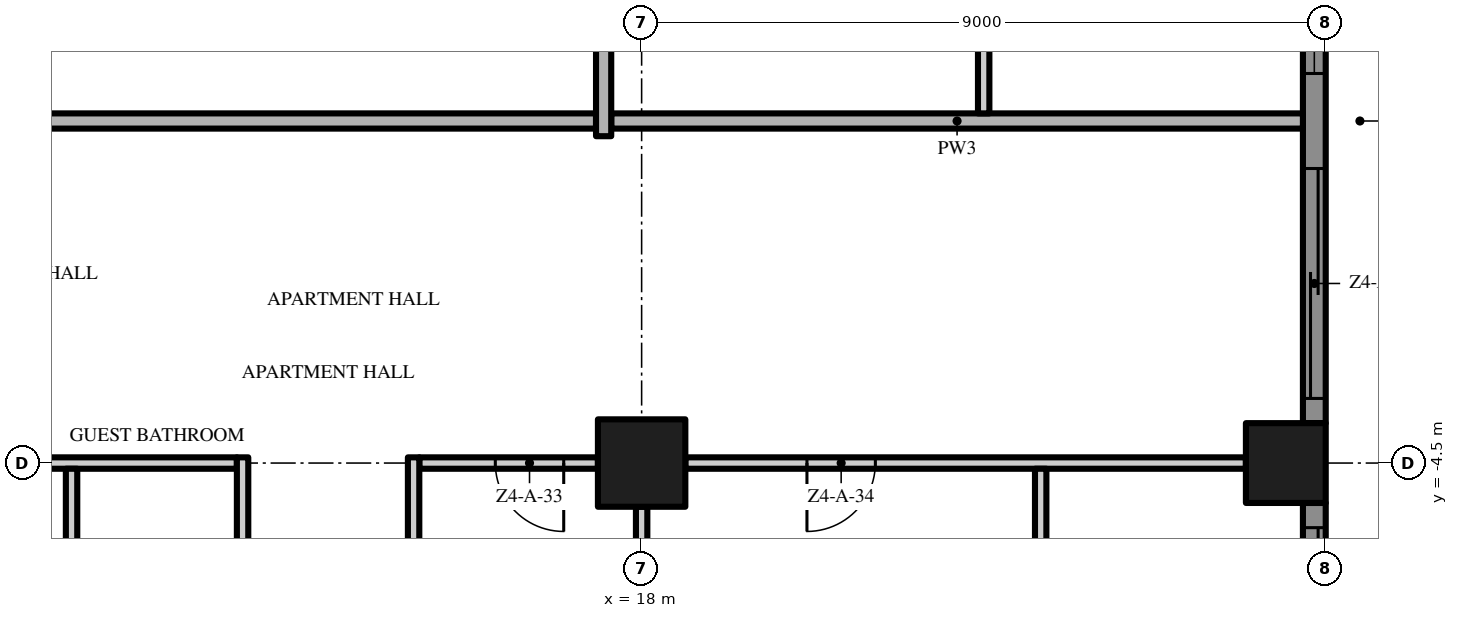
"""IFC4 building model, lengths in metres.
Left out: names, types, materials, properties, quantities, classifications, styles, units other than length and angle.
Written with IfcOpenShell. Run it as: python <this file> out.ifc"""

import sys

from ifc_helpers import new_model, si_unit, direction, frame, frame_2d, origin, origin_2d, place, context, subcontext, project, spatial, polyline, rectangle, outline, extrude, element, fill, save


model = new_model("IFC4")
c1 = context("Model", 3, precision=1e-05, world=origin(), true_north=direction((0.0, 1.0)))
c2 = subcontext(c1, "Body", "Model", "MODEL_VIEW")
j1 = project(units=[si_unit("LENGTHUNIT", "METRE"), si_unit("PLANEANGLEUNIT", "RADIAN")], contexts=[c1])
p1 = place(None, origin())
s1 = spatial("IfcSite", under=j1, at=p1, CompositionType="ELEMENT")
p2 = place(p1, origin())
s2 = spatial("IfcBuilding", under=s1, at=p2, CompositionType="ELEMENT")
p3 = place(p2, frame((0.0, 0.0, 192.0)))
s3 = spatial("IfcBuildingStorey", under=s2, at=p3, CompositionType="ELEMENT", Elevation=192.0)
p4 = place(p3, frame((18.0, -4.5, 0.0), z_axis=(0.0, 0.0, 1.0), x_axis=(1.0, 0.0, 0.0)))
e1 = element("IfcColumn", 1, at=p4, inside=s3, PredefinedType="COLUMN", context=c2, shape_type="SweptSolid", body=[
    extrude(rectangle(XDim=1.15, YDim=1.15, at=origin_2d()), origin(), (0.0, 0.0, 1.0), 3.5),
])
p5 = place(p3, frame((26.475, -4.5, 0.0), z_axis=(0.0, 0.0, 1.0), x_axis=(1.0, 0.0, 0.0)))
e2 = element("IfcColumn", 2, at=p5, inside=s3, PredefinedType="COLUMN", context=c2, shape_type="SweptSolid", body=[
    extrude(rectangle(XDim=1.05, YDim=1.05, at=origin_2d()), origin(), (0.0, 0.0, 1.0), 3.5),
])
p6 = place(p3, frame((26.85, -5.025, 0.0), z_axis=(0.0, 0.0, 1.0), x_axis=(0.0, -1.0, 0.0)))
e3 = element("IfcWall", 3, at=p6, inside=s3, PredefinedType="SOLIDWALL", context=c2, shape_type="SweptSolid", body=[
    extrude(rectangle(XDim=7.95, YDim=0.3, at=frame_2d((3.975, 0.0))), origin(), (0.0, 0.0, 1.0), 3.5),
])
p7 = place(p6, frame((4.6, 0.0, 0.45)))
e4 = element("IfcOpeningElement", 4, at=p7, cuts=e3, PredefinedType="OPENING", context=c2, shape_type="SweptSolid", body=[
    extrude(rectangle(XDim=3.025, YDim=2.65, at=frame_2d((1.512, 1.325))), frame((0.0, 0.16, 0.0), z_axis=(0.0, -1.0, 0.0), x_axis=(1.0, 0.0, 0.0)), (0.0, 0.0, 1.0), 0.32),
])
p8 = place(p6, frame((0.325, 0.0, 0.0)))
e5 = element("IfcOpeningElement", 5, at=p8, cuts=e3, PredefinedType="OPENING", context=c2, shape_type="SweptSolid", body=[
    extrude(rectangle(XDim=3.025, YDim=2.4, at=frame_2d((1.512, 1.2))), frame((0.0, 0.16, 0.0), z_axis=(0.0, -1.0, 0.0), x_axis=(1.0, 0.0, 0.0)), (0.0, 0.0, 1.0), 0.32),
])
p9 = place(p3, frame((26.85, 3.975, 0.0), z_axis=(0.0, 0.0, 1.0), x_axis=(0.0, -1.0, 0.0)))
e6 = element("IfcWall", 6, at=p9, inside=s3, PredefinedType="SOLIDWALL", context=c2, shape_type="SweptSolid", body=[
    extrude(rectangle(XDim=7.95, YDim=0.3, at=frame_2d((3.975, 0.0))), origin(), (0.0, 0.0, 1.0), 3.5),
])
p10 = place(p9, frame((4.6, 0.0, 0.0)))
e7 = element("IfcOpeningElement", 7, at=p10, cuts=e6, PredefinedType="OPENING", context=c2, shape_type="SweptSolid", body=[
    extrude(rectangle(XDim=3.025, YDim=2.4, at=frame_2d((1.512, 1.2))), frame((0.0, 0.16, 0.0), z_axis=(0.0, -1.0, 0.0), x_axis=(1.0, 0.0, 0.0)), (0.0, 0.0, 1.0), 0.32),
])
p11 = place(p9, frame((0.325, 0.0, 0.45)))
e8 = element("IfcOpeningElement", 8, at=p11, cuts=e6, PredefinedType="OPENING", context=c2, shape_type="SweptSolid", body=[
    extrude(rectangle(XDim=3.025, YDim=2.65, at=frame_2d((1.512, 1.325))), frame((0.0, 0.16, 0.0), z_axis=(0.0, -1.0, 0.0), x_axis=(1.0, 0.0, 0.0)), (0.0, 0.0, 1.0), 0.32),
])
p12 = place(p3, origin())
e9 = element("IfcWall", 9, at=p12, inside=s3, PredefinedType="USERDEFINED", context=c2, shape_type="SweptSolid", body=[
    extrude(outline(polyline([(29.649, -18.0), (28.988, -16.5), (28.255, -15.0), (27.731, -13.5), (27.6, -12.375), (27.615, -12.0), (27.951, -10.5), (28.612, -9.0), (29.345, -7.5), (29.869, -6.0), (30.0, -4.875), (29.985, -4.5), (29.649, -3.0), (28.988, -1.5), (28.255, 0.0), (27.731, 1.5), (27.6, 2.625), (27.615, 3.0), (27.951, 4.5), (28.612, 6.0), (29.345, 7.5), (29.869, 9.0), (30.0, 10.125), (29.985, 10.5), (29.649, 12.0), (28.988, 13.5), (28.255, 15.0), (27.731, 16.5), (27.6, 17.625), (27.615, 18.0), (27.365, 18.01), (27.349, 17.615), (27.486, 16.444), (28.024, 14.904), (28.761, 13.395), (29.41, 11.921), (29.736, 10.467), (29.749, 10.135), (29.624, 9.056), (29.114, 7.596), (28.385, 6.105), (27.713, 4.579), (27.366, 3.033), (27.349, 2.615), (27.486, 1.444), (28.024, -0.096), (28.761, -1.605), (29.41, -3.079), (29.736, -4.533), (29.749, -4.865), (29.624, -5.944), (29.114, -7.404), (28.385, -8.895), (27.713, -10.421), (27.366, -11.967), (27.349, -12.385), (27.486, -13.556), (28.024, -15.096), (28.761, -16.605), (29.42, -18.101), (29.649, -18.0)])), origin(), (0.0, 0.0, 1.0), 0.9),
])
p13 = place(p3, frame((9.575, -4.5, 0.0), z_axis=(0.0, 0.0, 1.0), x_axis=(1.0, 0.0, 0.0)))
e10 = element("IfcWall", 10, at=p13, inside=s3, PredefinedType="PARTITIONING", context=c2, shape_type="SweptSolid", body=[
    extrude(rectangle(XDim=3.1, YDim=0.15, at=frame_2d((1.55, 0.0))), origin(), (0.0, 0.0, 1.0), 3.5),
])
p14 = place(p3, frame((17.425, -4.5, 0.0), z_axis=(0.0, 0.0, 1.0), x_axis=(-1.0, 0.0, 0.0)))
e11 = element("IfcWall", 11, at=p14, inside=s3, PredefinedType="PARTITIONING", context=c2, shape_type="SweptSolid", body=[
    extrude(rectangle(XDim=2.35, YDim=0.15, at=frame_2d((1.175, 0.0))), origin(), (0.0, 0.0, 1.0), 3.5),
])
p15 = place(p14, frame((0.45, 0.0, 0.0)))
e12 = element("IfcOpeningElement", 12, at=p15, cuts=e11, PredefinedType="OPENING", context=c2, shape_type="SweptSolid", body=[
    extrude(rectangle(XDim=0.9, YDim=2.1, at=frame_2d((0.45, 1.05))), frame((0.0, 0.085, 0.0), z_axis=(0.0, -1.0, 0.0), x_axis=(1.0, 0.0, 0.0)), (0.0, 0.0, 1.0), 0.17),
])
p16 = place(p3, frame((25.95, -4.5, 0.0), z_axis=(0.0, 0.0, 1.0), x_axis=(-1.0, 0.0, 0.0)))
e13 = element("IfcWall", 13, at=p16, inside=s3, PredefinedType="PARTITIONING", context=c2, shape_type="SweptSolid", body=[
    extrude(rectangle(XDim=7.375, YDim=0.15, at=frame_2d((3.688, 0.0))), origin(), (0.0, 0.0, 1.0), 3.5),
])
p17 = place(p16, frame((4.875, 0.0, 0.0)))
e14 = element("IfcOpeningElement", 14, at=p17, cuts=e13, PredefinedType="OPENING", context=c2, shape_type="SweptSolid", body=[
    extrude(rectangle(XDim=0.9, YDim=2.1, at=frame_2d((0.45, 1.05))), frame((0.0, 0.085, 0.0), z_axis=(0.0, -1.0, 0.0), x_axis=(1.0, 0.0, 0.0)), (0.0, 0.0, 1.0), 0.17),
])
p18 = place(p3, frame((17.4, 0.0, 0.0), z_axis=(0.0, 0.0, 1.0), x_axis=(-1.0, 0.0, 0.0)))
e15 = element("IfcWall", 15, at=p18, inside=s3, PredefinedType="PARTITIONING", context=c2, shape_type="SweptSolid", body=[
    extrude(rectangle(XDim=17.3, YDim=0.2, at=frame_2d((8.65, 0.0))), origin(), (0.0, 0.0, 1.0), 3.5),
])
p19 = place(p18, frame((7.65, 0.0, 0.0)))
e16 = element("IfcOpeningElement", 16, at=p19, cuts=e15, PredefinedType="OPENING", context=c2, shape_type="SweptSolid", body=[
    extrude(rectangle(XDim=1.5, YDim=2.4, at=frame_2d((0.75, 1.2))), frame((0.0, 0.11, 0.0), z_axis=(0.0, -1.0, 0.0), x_axis=(1.0, 0.0, 0.0)), (0.0, 0.0, 1.0), 0.22),
])
p20 = place(p3, frame((17.6, 0.0, 0.0), z_axis=(0.0, 0.0, 1.0), x_axis=(1.0, 0.0, 0.0)))
e17 = element("IfcWall", 17, at=p20, inside=s3, PredefinedType="PARTITIONING", context=c2, shape_type="SweptSolid", body=[
    extrude(rectangle(XDim=9.1, YDim=0.2, at=frame_2d((4.55, 0.0))), origin(), (0.0, 0.0, 1.0), 3.5),
])
p21 = place(p3, frame((10.5, -8.925, 0.0), z_axis=(0.0, 0.0, 1.0), x_axis=(0.0, 1.0, 0.0)))
e18 = element("IfcWall", 18, at=p21, inside=s3, PredefinedType="PARTITIONING", context=c2, shape_type="SweptSolid", body=[
    extrude(rectangle(XDim=4.35, YDim=0.15, at=frame_2d((2.175, 0.0))), origin(), (0.0, 0.0, 1.0), 3.5),
])
p22 = place(p3, frame((12.75, -8.925, 0.0), z_axis=(0.0, 0.0, 1.0), x_axis=(0.0, 1.0, 0.0)))
e19 = element("IfcWall", 19, at=p22, inside=s3, PredefinedType="PARTITIONING", context=c2, shape_type="SweptSolid", body=[
    extrude(rectangle(XDim=4.5, YDim=0.15, at=frame_2d((2.25, 0.0))), origin(), (0.0, 0.0, 1.0), 3.5),
])
p23 = place(p22, frame((1.75, 0.0, 0.0)))
e20 = element("IfcOpeningElement", 20, at=p23, cuts=e19, PredefinedType="OPENING", context=c2, shape_type="SweptSolid", body=[
    extrude(rectangle(XDim=0.9, YDim=2.1, at=frame_2d((0.45, 1.05))), frame((0.0, 0.085, 0.0), z_axis=(0.0, -1.0, 0.0), x_axis=(1.0, 0.0, 0.0)), (0.0, 0.0, 1.0), 0.17),
])
p24 = place(p3, frame((15.0, -9.075, 0.0), z_axis=(0.0, 0.0, 1.0), x_axis=(0.0, 1.0, 0.0)))
e21 = element("IfcWall", 21, at=p24, inside=s3, PredefinedType="PARTITIONING", context=c2, shape_type="SweptSolid", body=[
    extrude(rectangle(XDim=4.65, YDim=0.15, at=frame_2d((2.325, 0.0))), origin(), (0.0, 0.0, 1.0), 3.5),
])
p25 = place(p3, frame((17.5, -0.2, 0.0), z_axis=(0.0, 0.0, 1.0), x_axis=(0.0, 1.0, 0.0)))
e22 = element("IfcWall", 22, at=p25, inside=s3, PredefinedType="PARTITIONING", context=c2, shape_type="SweptSolid", body=[
    extrude(rectangle(XDim=4.125, YDim=0.2, at=frame_2d((2.062, 0.0))), origin(), (0.0, 0.0, 1.0), 3.5),
])
p26 = place(p3, frame((18.0, -8.925, 0.0), z_axis=(0.0, 0.0, 1.0), x_axis=(0.0, 1.0, 0.0)))
e23 = element("IfcWall", 23, at=p26, inside=s3, PredefinedType="PARTITIONING", context=c2, shape_type="SweptSolid", body=[
    extrude(rectangle(XDim=3.85, YDim=0.15, at=frame_2d((1.925, 0.0))), origin(), (0.0, 0.0, 1.0), 3.5),
])
p27 = place(p3, frame((22.5, 17.475, 0.0), z_axis=(0.0, 0.0, 1.0), x_axis=(0.0, -1.0, 0.0)))
e24 = element("IfcWall", 24, at=p27, inside=s3, PredefinedType="PARTITIONING", context=c2, shape_type="SweptSolid", body=[
    extrude(rectangle(XDim=17.375, YDim=0.15, at=frame_2d((8.688, 0.0))), origin(), (0.0, 0.0, 1.0), 3.5),
])
p28 = place(p27, frame((14.725, 0.0, 0.0)))
e25 = element("IfcOpeningElement", 25, at=p28, cuts=e24, PredefinedType="OPENING", context=c2, shape_type="SweptSolid", body=[
    extrude(rectangle(XDim=1.0, YDim=2.4, at=frame_2d((0.5, 1.2))), frame((0.0, 0.085, 0.0), z_axis=(0.0, -1.0, 0.0), x_axis=(1.0, 0.0, 0.0)), (0.0, 0.0, 1.0), 0.17),
])
p29 = place(p27, frame((9.125, 0.0, 0.0)))
e26 = element("IfcOpeningElement", 26, at=p29, cuts=e24, PredefinedType="OPENING", context=c2, shape_type="SweptSolid", body=[
    extrude(rectangle(XDim=1.0, YDim=2.4, at=frame_2d((0.5, 1.2))), frame((0.0, 0.085, 0.0), z_axis=(0.0, -1.0, 0.0), x_axis=(1.0, 0.0, 0.0)), (0.0, 0.0, 1.0), 0.17),
])
p30 = place(p27, frame((2.325, 0.0, 0.0)))
e27 = element("IfcOpeningElement", 27, at=p30, cuts=e24, PredefinedType="OPENING", context=c2, shape_type="SweptSolid", body=[
    extrude(rectangle(XDim=1.8, YDim=2.4, at=frame_2d((0.9, 1.2))), frame((0.0, 0.085, 0.0), z_axis=(0.0, -1.0, 0.0), x_axis=(1.0, 0.0, 0.0)), (0.0, 0.0, 1.0), 0.17),
])
p31 = place(p3, frame((23.25, -4.575, 0.0), z_axis=(0.0, 0.0, 1.0), x_axis=(0.0, -1.0, 0.0)))
e28 = element("IfcWall", 28, at=p31, inside=s3, PredefinedType="PARTITIONING", context=c2, shape_type="SweptSolid", body=[
    extrude(rectangle(XDim=4.35, YDim=0.15, at=frame_2d((2.175, 0.0))), origin(), (0.0, 0.0, 1.0), 3.5),
])
p32 = place(p31, frame((1.7, 0.0, 0.0)))
e29 = element("IfcOpeningElement", 29, at=p32, cuts=e28, PredefinedType="OPENING", context=c2, shape_type="SweptSolid", body=[
    extrude(rectangle(XDim=0.9, YDim=2.1, at=frame_2d((0.45, 1.05))), frame((0.0, 0.085, 0.0), z_axis=(0.0, -1.0, 0.0), x_axis=(1.0, 0.0, 0.0)), (0.0, 0.0, 1.0), 0.17),
])
p33 = place(p8, origin())
e30 = element("IfcDoor", 30, at=p33, inside=s3, OperationType="SINGLE_SWING_LEFT", PredefinedType="DOOR", context=c2, shape_type="SweptSolid", body=[
    extrude(rectangle(XDim=3.025, YDim=2.4, at=frame_2d((1.512, 1.2))), frame((0.0, 0.025, 0.0), z_axis=(0.0, -1.0, 0.0), x_axis=(1.0, 0.0, 0.0)), (0.0, 0.0, 1.0), 0.05),
])
fill(e5, e30)
p34 = place(p10, origin())
e31 = element("IfcDoor", 31, at=p34, inside=s3, OperationType="SINGLE_SWING_LEFT", PredefinedType="DOOR", context=c2, shape_type="SweptSolid", body=[
    extrude(rectangle(XDim=3.025, YDim=2.4, at=frame_2d((1.512, 1.2))), frame((0.0, 0.025, 0.0), z_axis=(0.0, -1.0, 0.0), x_axis=(1.0, 0.0, 0.0)), (0.0, 0.0, 1.0), 0.05),
])
fill(e7, e31)
p35 = place(p11, origin())
e32 = element("IfcWindow", 32, at=p35, inside=s3, PartitioningType="SINGLE_PANEL", PredefinedType="WINDOW", context=c2, shape_type="SweptSolid", body=[
    extrude(rectangle(XDim=3.025, YDim=2.65, at=frame_2d((1.512, 1.325))), frame((0.0, 0.03, 0.0), z_axis=(0.0, -1.0, 0.0), x_axis=(1.0, 0.0, 0.0)), (0.0, 0.0, 1.0), 0.06),
])
fill(e8, e32)
p36 = place(p15, origin())
e33 = element("IfcDoor", 33, at=p36, inside=s3, OperationType="SINGLE_SWING_LEFT", PredefinedType="DOOR", context=c2, shape_type="SweptSolid", body=[
    extrude(rectangle(XDim=0.9, YDim=2.1, at=frame_2d((0.45, 1.05))), frame((0.0, 0.025, 0.0), z_axis=(0.0, -1.0, 0.0), x_axis=(1.0, 0.0, 0.0)), (0.0, 0.0, 1.0), 0.05),
])
fill(e12, e33)
p37 = place(p17, origin())
e34 = element("IfcDoor", 34, at=p37, inside=s3, OperationType="SINGLE_SWING_RIGHT", PredefinedType="DOOR", context=c2, shape_type="SweptSolid", body=[
    extrude(rectangle(XDim=0.9, YDim=2.1, at=frame_2d((0.45, 1.05))), frame((0.0, 0.025, 0.0), z_axis=(0.0, -1.0, 0.0), x_axis=(1.0, 0.0, 0.0)), (0.0, 0.0, 1.0), 0.05),
])
fill(e14, e34)
save(model, sys.argv[1])
